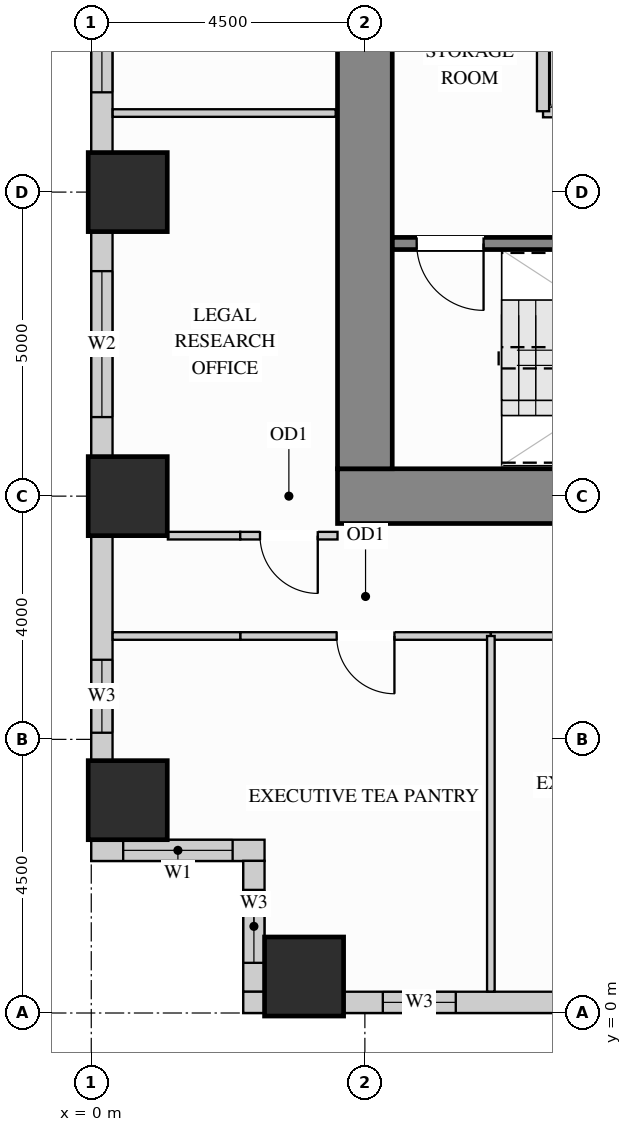
"""IFC4 building model, lengths in metres.
Left out: names, types, materials, properties, quantities, classifications, styles, units other than length and angle.
Written with IfcOpenShell. Run it as: python <this file> out.ifc"""

import sys

from ifc_helpers import new_model, si_unit, direction, frame, frame_2d, origin, origin_2d, place, context, subcontext, project, spatial, rectangle, extrude, source, transform, mapped, element, fill, save


model = new_model("IFC4")
c1 = context("Model", 3, precision=1e-05, world=origin(), true_north=direction((0.0, 1.0)))
c2 = subcontext(c1, "Body", "Model", "MODEL_VIEW")
j1 = project(units=[si_unit("LENGTHUNIT", "METRE"), si_unit("PLANEANGLEUNIT", "RADIAN")], contexts=[c1])
p1 = place(None, origin())
s1 = spatial("IfcSite", under=j1, at=p1, CompositionType="ELEMENT")
p2 = place(p1, origin())
s2 = spatial("IfcBuilding", under=s1, at=p2, CompositionType="ELEMENT")
p3 = place(p2, frame((0.0, 0.0, 51.3)))
s3 = spatial("IfcBuildingStorey", under=s2, at=p3, CompositionType="ELEMENT", Elevation=51.3)
m1 = source(origin(), c2, "Body", "SweptSolid", [
    extrude(rectangle(XDim=1.3, YDim=1.3, at=origin_2d()), origin(), (0.0, 0.0, 1.0), 3.38),
])
for number, where, z_axis, x_axis in (
    (1, (3.5, 0.6, 0.0), (0.0, 0.0, 1.0), (1.0, 0.0, 0.0)),
    (2, (0.6, 13.5, 0.0), (0.0, 0.0, 1.0), (1.0, 0.0, 0.0)),
    (3, (0.6, 3.5, 0.0), (0.0, 0.0, 1.0), (1.0, 0.0, 0.0)),
    (4, (0.6, 8.5, 0.0), (0.0, 0.0, 1.0), (1.0, 0.0, 0.0)),
):
    element("IfcColumn", number, at=place(p3, frame(where, z_axis=z_axis, x_axis=x_axis)), inside=s3, PredefinedType="COLUMN", context=c2, shape_type="MappedRepresentation", body=[
        mapped(m1, transform((0.0, 0.0, 0.0), x_axis=(1.0, 0.0, 0.0), y_axis=(0.0, 1.0, 0.0), z_axis=(0.0, 0.0, 1.0))),
    ])
m2 = source(origin(), c2, "Body", "SweptSolid", [
    extrude(rectangle(XDim=10.9, YDim=0.9, at=frame_2d((5.45, 0.0))), origin(), (0.0, 0.0, 1.0), 3.38),
])
p4 = place(p3, frame((4.05, 8.5, 0.0), z_axis=(0.0, 0.0, 1.0), x_axis=(1.0, 0.0, 0.0)))
e5 = element("IfcWall", 5, at=p4, inside=s3, PredefinedType="SHEAR", context=c2, shape_type="MappedRepresentation", body=[
    mapped(m2, transform((0.0, 0.0, 0.0), x_axis=(1.0, 0.0, 0.0), y_axis=(0.0, 1.0, 0.0), z_axis=(0.0, 0.0, 1.0))),
])
m3 = source(origin(), c2, "Body", "SweptSolid", [
    extrude(rectangle(XDim=20.1, YDim=0.9, at=frame_2d((10.05, 0.0))), origin(), (0.0, 0.0, 1.0), 3.38),
])
p5 = place(p3, frame((4.5, 8.95, 0.0), z_axis=(0.0, 0.0, 1.0), x_axis=(0.0, 1.0, 0.0)))
e6 = element("IfcWall", 6, at=p5, inside=s3, PredefinedType="SHEAR", context=c2, shape_type="MappedRepresentation", body=[
    mapped(m3, transform((0.0, 0.0, 0.0), x_axis=(1.0, 0.0, 0.0), y_axis=(0.0, 1.0, 0.0), z_axis=(0.0, 0.0, 1.0))),
])
p6 = place(p3, frame((0.175, 17.352, 0.0), z_axis=(0.0, 0.0, 1.0), x_axis=(0.0, -1.0, 0.0)))
e7 = element("IfcWall", 7, at=p6, inside=s3, PredefinedType="SOLIDWALL", context=c2, shape_type="SweptSolid", body=[
    extrude(rectangle(XDim=3.204, YDim=0.35, at=frame_2d((1.602, 0.0))), origin(), (0.0, 0.0, 1.0), 2.51),
])
p7 = place(p6, frame((0.411, 0.0, 0.78)))
e8 = element("IfcOpeningElement", 8, at=p7, cuts=e7, PredefinedType="OPENING", context=c2, shape_type="SweptSolid", body=[
    extrude(rectangle(XDim=1.8, YDim=1.55, at=frame_2d((0.9, 0.775))), frame((0.0, 0.185, 0.0), z_axis=(0.0, -1.0, 0.0), x_axis=(1.0, 0.0, 0.0)), (0.0, 0.0, 1.0), 0.37),
])
p8 = place(p3, frame((0.175, 12.852, 0.0), z_axis=(0.0, 0.0, 1.0), x_axis=(0.0, -1.0, 0.0)))
e9 = element("IfcWall", 9, at=p8, inside=s3, PredefinedType="SOLIDWALL", context=c2, shape_type="SweptSolid", body=[
    extrude(rectangle(XDim=3.704, YDim=0.35, at=frame_2d((1.852, 0.0))), origin(), (0.0, 0.0, 1.0), 2.51),
])
p9 = place(p8, frame((0.652, 0.0, 0.78)))
e10 = element("IfcOpeningElement", 10, at=p9, cuts=e9, PredefinedType="OPENING", context=c2, shape_type="SweptSolid", body=[
    extrude(rectangle(XDim=2.4, YDim=1.55, at=frame_2d((1.2, 0.775))), frame((0.0, 0.185, 0.0), z_axis=(0.0, -1.0, 0.0), x_axis=(1.0, 0.0, 0.0)), (0.0, 0.0, 1.0), 0.37),
])
p10 = place(p3, frame((0.175, 7.852, 0.0), z_axis=(0.0, 0.0, 1.0), x_axis=(0.0, -1.0, 0.0)))
e11 = element("IfcWall", 11, at=p10, inside=s3, PredefinedType="SOLIDWALL", context=c2, shape_type="SweptSolid", body=[
    extrude(rectangle(XDim=3.704, YDim=0.35, at=frame_2d((1.852, 0.0))), origin(), (0.0, 0.0, 1.0), 2.51),
])
p11 = place(p10, frame((2.043, 0.0, 0.78)))
e12 = element("IfcOpeningElement", 12, at=p11, cuts=e11, PredefinedType="OPENING", context=c2, shape_type="SweptSolid", body=[
    extrude(rectangle(XDim=1.2, YDim=1.55, at=frame_2d((0.6, 0.775))), frame((0.0, 0.185, 0.0), z_axis=(0.0, -1.0, 0.0), x_axis=(1.0, 0.0, 0.0)), (0.0, 0.0, 1.0), 0.37),
])
p12 = place(p3, frame((0.0, 2.675, 0.0), z_axis=(0.0, 0.0, 1.0), x_axis=(1.0, 0.0, 0.0)))
e13 = element("IfcWall", 13, at=p12, inside=s3, PredefinedType="SOLIDWALL", context=c2, shape_type="SweptSolid", body=[
    extrude(rectangle(XDim=2.85, YDim=0.35, at=frame_2d((1.425, 0.0))), origin(), (0.0, 0.0, 1.0), 3.365),
])
p13 = place(p12, frame((0.525, 0.0, 0.78)))
e14 = element("IfcOpeningElement", 14, at=p13, cuts=e13, PredefinedType="OPENING", context=c2, shape_type="SweptSolid", body=[
    extrude(rectangle(XDim=1.8, YDim=2.1, at=frame_2d((0.9, 1.05))), frame((0.0, 0.185, 0.0), z_axis=(0.0, -1.0, 0.0), x_axis=(1.0, 0.0, 0.0)), (0.0, 0.0, 1.0), 0.37),
])
p14 = place(p3, frame((2.675, 2.502, 0.0), z_axis=(0.0, 0.0, 1.0), x_axis=(0.0, -1.0, 0.0)))
e15 = element("IfcWall", 15, at=p14, inside=s3, PredefinedType="SOLIDWALL", context=c2, shape_type="SweptSolid", body=[
    extrude(rectangle(XDim=2.154, YDim=0.35, at=frame_2d((1.077, 0.0))), origin(), (0.0, 0.0, 1.0), 3.365),
])
p15 = place(p14, frame((0.477, 0.0, 0.78)))
e16 = element("IfcOpeningElement", 16, at=p15, cuts=e15, PredefinedType="OPENING", context=c2, shape_type="SweptSolid", body=[
    extrude(rectangle(XDim=1.2, YDim=2.1, at=frame_2d((0.6, 1.05))), frame((0.0, 0.185, 0.0), z_axis=(0.0, -1.0, 0.0), x_axis=(1.0, 0.0, 0.0)), (0.0, 0.0, 1.0), 0.37),
])
m4 = source(origin(), c2, "Body", "SweptSolid", [
    extrude(rectangle(XDim=0.352, YDim=0.35, at=frame_2d((0.176, 0.0))), origin(), (0.0, 0.0, 1.0), 3.365),
])
p16 = place(p3, frame((2.5, 0.175, 0.0), z_axis=(0.0, 0.0, 1.0), x_axis=(1.0, 0.0, 0.0)))
e17 = element("IfcWall", 17, at=p16, inside=s3, PredefinedType="SOLIDWALL", context=c2, shape_type="MappedRepresentation", body=[
    mapped(m4, transform((0.0, 0.0, 0.0), x_axis=(1.0, 0.0, 0.0), y_axis=(0.0, 1.0, 0.0), z_axis=(0.0, 0.0, 1.0))),
])
p17 = place(p3, frame((4.148, 0.175, 0.0), z_axis=(0.0, 0.0, 1.0), x_axis=(1.0, 0.0, 0.0)))
e18 = element("IfcWall", 18, at=p17, inside=s3, PredefinedType="SOLIDWALL", context=c2, shape_type="SweptSolid", body=[
    extrude(rectangle(XDim=4.204, YDim=0.35, at=frame_2d((2.102, 0.0))), origin(), (0.0, 0.0, 1.0), 2.51),
])
p18 = place(p17, frame((0.647, 0.0, 0.78)))
e19 = element("IfcOpeningElement", 19, at=p18, cuts=e18, PredefinedType="OPENING", context=c2, shape_type="SweptSolid", body=[
    extrude(rectangle(XDim=1.2, YDim=1.55, at=frame_2d((0.6, 0.775))), frame((0.0, 0.185, 0.0), z_axis=(0.0, -1.0, 0.0), x_axis=(1.0, 0.0, 0.0)), (0.0, 0.0, 1.0), 0.37),
])
m5 = source(origin(), c2, "Body", "SweptSolid", [
    extrude(rectangle(XDim=1.19, YDim=0.125, at=frame_2d((0.595, 0.0))), origin(), (0.0, 0.0, 1.0), 3.365),
])
p19 = place(p3, frame((1.26, 7.85, 0.0), z_axis=(0.0, 0.0, 1.0), x_axis=(1.0, 0.0, 0.0)))
e20 = element("IfcWall", 20, at=p19, inside=s3, PredefinedType="PARTITIONING", context=c2, shape_type="MappedRepresentation", body=[
    mapped(m5, transform((0.0, 0.0, 0.0), x_axis=(1.0, 0.0, 0.0), y_axis=(0.0, 1.0, 0.0), z_axis=(0.0, 0.0, 1.0))),
])
p20 = place(p3, frame((2.45, 7.85, 0.0), z_axis=(0.0, 0.0, 1.0), x_axis=(1.0, 0.0, 0.0)))
e21 = element("IfcWall", 21, at=p20, inside=s3, PredefinedType="PARTITIONING", context=c2, shape_type="SweptSolid", body=[
    extrude(rectangle(XDim=1.6, YDim=0.125, at=frame_2d((0.8, 0.0))), origin(), (0.0, 0.0, 1.0), 3.365),
])
p21 = place(p20, frame((0.325, 0.0, 0.0)))
e22 = element("IfcOpeningElement", 22, at=p21, cuts=e21, PredefinedType="OPENING", context=c2, shape_type="SweptSolid", body=[
    extrude(rectangle(XDim=0.95, YDim=2.15, at=frame_2d((0.475, 1.075))), frame((0.0, 0.073, 0.0), z_axis=(0.0, -1.0, 0.0), x_axis=(1.0, 0.0, 0.0)), (0.0, 0.0, 1.0), 0.145),
])
p22 = place(p3, frame((2.45, 6.2, 0.0), z_axis=(0.0, 0.0, 1.0), x_axis=(1.0, 0.0, 0.0)))
e23 = element("IfcWall", 23, at=p22, inside=s3, PredefinedType="PARTITIONING", context=c2, shape_type="SweptSolid", body=[
    extrude(rectangle(XDim=4.122, YDim=0.125, at=frame_2d((2.061, 0.0))), origin(), (0.0, 0.0, 1.0), 2.828),
])
p23 = place(p22, frame((1.586, 0.0, 0.0)))
e24 = element("IfcOpeningElement", 24, at=p23, cuts=e23, PredefinedType="OPENING", context=c2, shape_type="SweptSolid", body=[
    extrude(rectangle(XDim=0.95, YDim=2.15, at=frame_2d((0.475, 1.075))), frame((0.0, 0.073, 0.0), z_axis=(0.0, -1.0, 0.0), x_axis=(1.0, 0.0, 0.0)), (0.0, 0.0, 1.0), 0.145),
])
p24 = place(p3, frame((6.572, 6.2, 0.0), z_axis=(0.0, 0.0, 1.0), x_axis=(1.0, 0.0, 0.0)))
e25 = element("IfcWall", 25, at=p24, inside=s3, PredefinedType="PARTITIONING", context=c2, shape_type="SweptSolid", body=[
    extrude(rectangle(XDim=3.972, YDim=0.125, at=frame_2d((1.986, 0.0))), origin(), (0.0, 0.0, 1.0), 2.828),
])
p25 = place(p24, frame((1.511, 0.0, 0.0)))
e26 = element("IfcOpeningElement", 26, at=p25, cuts=e25, PredefinedType="OPENING", context=c2, shape_type="SweptSolid", body=[
    extrude(rectangle(XDim=0.95, YDim=2.15, at=frame_2d((0.475, 1.075))), frame((0.0, 0.073, 0.0), z_axis=(0.0, -1.0, 0.0), x_axis=(1.0, 0.0, 0.0)), (0.0, 0.0, 1.0), 0.145),
])
m6 = source(origin(), c2, "Body", "SweptSolid", [
    extrude(rectangle(XDim=2.098, YDim=0.125, at=frame_2d((1.049, 0.0))), origin(), (0.0, 0.0, 1.0), 2.828),
])
p26 = place(p3, frame((0.352, 6.2, 0.0), z_axis=(0.0, 0.0, 1.0), x_axis=(1.0, 0.0, 0.0)))
e27 = element("IfcWall", 27, at=p26, inside=s3, PredefinedType="PARTITIONING", context=c2, shape_type="MappedRepresentation", body=[
    mapped(m6, transform((0.0, 0.0, 0.0), x_axis=(1.0, 0.0, 0.0), y_axis=(0.0, 1.0, 0.0), z_axis=(0.0, 0.0, 1.0))),
])
m7 = source(origin(), c2, "Body", "SweptSolid", [
    extrude(rectangle(XDim=5.848, YDim=0.125, at=frame_2d((2.924, 0.0))), origin(), (0.0, 0.0, 1.0), 3.365),
])
p27 = place(p3, frame((6.572, 0.352, 0.0), z_axis=(0.0, 0.0, 1.0), x_axis=(0.0, 1.0, 0.0)))
e28 = element("IfcWall", 28, at=p27, inside=s3, PredefinedType="PARTITIONING", context=c2, shape_type="MappedRepresentation", body=[
    mapped(m7, transform((0.0, 0.0, 0.0), x_axis=(1.0, 0.0, 0.0), y_axis=(0.0, 1.0, 0.0), z_axis=(0.0, 0.0, 1.0))),
])
m8 = source(origin(), c2, "Body", "SweptSolid", [
    extrude(rectangle(XDim=3.668, YDim=0.125, at=frame_2d((1.834, 0.0))), origin(), (0.0, 0.0, 1.0), 3.365),
])
p28 = place(p3, frame((0.352, 14.8, 0.0), z_axis=(0.0, 0.0, 1.0), x_axis=(1.0, 0.0, 0.0)))
e29 = element("IfcWall", 29, at=p28, inside=s3, PredefinedType="PARTITIONING", context=c2, shape_type="MappedRepresentation", body=[
    mapped(m8, transform((0.0, 0.0, 0.0), x_axis=(1.0, 0.0, 0.0), y_axis=(0.0, 1.0, 0.0), z_axis=(0.0, 0.0, 1.0))),
])
m9 = source(origin(), c2, "Body", "SweptSolid", [
    extrude(rectangle(XDim=2.04, YDim=0.2, at=frame_2d((1.02, 0.0))), origin(), (0.0, 0.0, 1.0), 3.365),
])
p29 = place(p3, frame((7.43, 14.83, 0.0), z_axis=(0.0, 0.0, 1.0), x_axis=(1.0, 0.0, 0.0)))
e30 = element("IfcWall", 30, at=p29, inside=s3, PredefinedType="PARTITIONING", context=c2, shape_type="MappedRepresentation", body=[
    mapped(m9, transform((0.0, 0.0, 0.0), x_axis=(1.0, 0.0, 0.0), y_axis=(0.0, 1.0, 0.0), z_axis=(0.0, 0.0, 1.0))),
])
m10 = source(origin(), c2, "Body", "SweptSolid", [
    extrude(rectangle(XDim=2.84, YDim=0.2, at=frame_2d((1.42, 0.0))), origin(), (0.0, 0.0, 1.0), 3.365),
])
p30 = place(p3, frame((7.43, 14.83, 0.0), z_axis=(0.0, 0.0, 1.0), x_axis=(0.0, 1.0, 0.0)))
e31 = element("IfcWall", 31, at=p30, inside=s3, PredefinedType="PARTITIONING", context=c2, shape_type="MappedRepresentation", body=[
    mapped(m10, transform((0.0, 0.0, 0.0), x_axis=(1.0, 0.0, 0.0), y_axis=(0.0, 1.0, 0.0), z_axis=(0.0, 0.0, 1.0))),
])
p31 = place(p3, frame((4.952, 12.655, 0.0), z_axis=(0.0, 0.0, 1.0), x_axis=(1.0, 0.0, 0.0)))
e32 = element("IfcWall", 32, at=p31, inside=s3, PredefinedType="SHEAR", context=c2, shape_type="SweptSolid", body=[
    extrude(rectangle(XDim=7.453, YDim=0.2, at=frame_2d((3.727, 0.0))), origin(), (0.0, 0.0, 1.0), 3.38),
])
p32 = place(p31, frame((0.4, 0.0, 0.0)))
e33 = element("IfcOpeningElement", 33, at=p32, cuts=e32, PredefinedType="OPENING", context=c2, shape_type="SweptSolid", body=[
    extrude(rectangle(XDim=1.1, YDim=2.15, at=frame_2d((0.55, 1.075))), frame((0.0, 0.11, 0.0), z_axis=(0.0, -1.0, 0.0), x_axis=(1.0, 0.0, 0.0)), (0.0, 0.0, 1.0), 0.22),
])
m11 = source(origin(), c2, "Body", "SweptSolid", [
    extrude(rectangle(XDim=0.95, YDim=2.15, at=frame_2d((0.475, 1.075))), frame((0.0, 0.025, 0.0), z_axis=(0.0, -1.0, 0.0), x_axis=(1.0, 0.0, 0.0)), (0.0, 0.0, 1.0), 0.05),
])
p33 = place(p23, origin())
e34 = element("IfcDoor", 34, at=p33, inside=s3, OperationType="SINGLE_SWING_RIGHT", PredefinedType="DOOR", context=c2, shape_type="MappedRepresentation", body=[
    mapped(m11, transform((0.0, 0.0, 0.0), x_axis=(1.0, 0.0, 0.0), y_axis=(0.0, 1.0, 0.0), z_axis=(0.0, 0.0, 1.0))),
])
fill(e24, e34)
p34 = place(p21, origin())
e35 = element("IfcDoor", 35, at=p34, inside=s3, OperationType="SINGLE_SWING_RIGHT", PredefinedType="DOOR", context=c2, shape_type="MappedRepresentation", body=[
    mapped(m11, transform((0.0, 0.0, 0.0), x_axis=(1.0, 0.0, 0.0), y_axis=(0.0, 1.0, 0.0), z_axis=(0.0, 0.0, 1.0))),
])
fill(e22, e35)
m12 = source(origin(), c2, "Body", "SweptSolid", [
    extrude(rectangle(XDim=1.1, YDim=2.15, at=frame_2d((0.55, 1.075))), frame((0.0, 0.025, 0.0), z_axis=(0.0, -1.0, 0.0), x_axis=(1.0, 0.0, 0.0)), (0.0, 0.0, 1.0), 0.05),
])
p35 = place(p32, origin())
e36 = element("IfcDoor", 36, at=p35, inside=s3, OperationType="SINGLE_SWING_RIGHT", PredefinedType="DOOR", context=c2, shape_type="MappedRepresentation", body=[
    mapped(m12, transform((0.0, 0.0, 0.0), x_axis=(1.0, 0.0, 0.0), y_axis=(0.0, 1.0, 0.0), z_axis=(0.0, 0.0, 1.0))),
])
fill(e33, e36)
m13 = source(origin(), c2, "Body", "SweptSolid", [
    extrude(rectangle(XDim=1.8, YDim=1.55, at=frame_2d((0.9, 0.775))), frame((0.0, 0.03, 0.0), z_axis=(0.0, -1.0, 0.0), x_axis=(1.0, 0.0, 0.0)), (0.0, 0.0, 1.0), 0.06),
])
p36 = place(p7, origin())
e37 = element("IfcWindow", 37, at=p36, inside=s3, PartitioningType="SINGLE_PANEL", PredefinedType="WINDOW", context=c2, shape_type="MappedRepresentation", body=[
    mapped(m13, transform((0.0, 0.0, 0.0), x_axis=(1.0, 0.0, 0.0), y_axis=(0.0, 1.0, 0.0), z_axis=(0.0, 0.0, 1.0))),
])
fill(e8, e37)
m14 = source(origin(), c2, "Body", "SweptSolid", [
    extrude(rectangle(XDim=1.8, YDim=2.1, at=frame_2d((0.9, 1.05))), frame((0.0, 0.03, 0.0), z_axis=(0.0, -1.0, 0.0), x_axis=(1.0, 0.0, 0.0)), (0.0, 0.0, 1.0), 0.06),
])
p37 = place(p13, origin())
e38 = element("IfcWindow", 38, at=p37, inside=s3, PartitioningType="SINGLE_PANEL", PredefinedType="WINDOW", context=c2, shape_type="MappedRepresentation", body=[
    mapped(m14, transform((0.0, 0.0, 0.0), x_axis=(1.0, 0.0, 0.0), y_axis=(0.0, 1.0, 0.0), z_axis=(0.0, 0.0, 1.0))),
])
fill(e14, e38)
m15 = source(origin(), c2, "Body", "SweptSolid", [
    extrude(rectangle(XDim=2.4, YDim=1.55, at=frame_2d((1.2, 0.775))), frame((0.0, 0.03, 0.0), z_axis=(0.0, -1.0, 0.0), x_axis=(1.0, 0.0, 0.0)), (0.0, 0.0, 1.0), 0.06),
])
p38 = place(p9, origin())
e39 = element("IfcWindow", 39, at=p38, inside=s3, PartitioningType="SINGLE_PANEL", PredefinedType="WINDOW", context=c2, shape_type="MappedRepresentation", body=[
    mapped(m15, transform((0.0, 0.0, 0.0), x_axis=(1.0, 0.0, 0.0), y_axis=(0.0, 1.0, 0.0), z_axis=(0.0, 0.0, 1.0))),
])
fill(e10, e39)
m16 = source(origin(), c2, "Body", "SweptSolid", [
    extrude(rectangle(XDim=1.2, YDim=1.55, at=frame_2d((0.6, 0.775))), frame((0.0, 0.03, 0.0), z_axis=(0.0, -1.0, 0.0), x_axis=(1.0, 0.0, 0.0)), (0.0, 0.0, 1.0), 0.06),
])
p39 = place(p11, origin())
e40 = element("IfcWindow", 40, at=p39, inside=s3, PartitioningType="SINGLE_PANEL", PredefinedType="WINDOW", context=c2, shape_type="MappedRepresentation", body=[
    mapped(m16, transform((0.0, 0.0, 0.0), x_axis=(1.0, 0.0, 0.0), y_axis=(0.0, 1.0, 0.0), z_axis=(0.0, 0.0, 1.0))),
])
fill(e12, e40)
m17 = source(origin(), c2, "Body", "SweptSolid", [
    extrude(rectangle(XDim=1.2, YDim=2.1, at=frame_2d((0.6, 1.05))), frame((0.0, 0.03, 0.0), z_axis=(0.0, -1.0, 0.0), x_axis=(1.0, 0.0, 0.0)), (0.0, 0.0, 1.0), 0.06),
])
p40 = place(p15, origin())
e41 = element("IfcWindow", 41, at=p40, inside=s3, PartitioningType="SINGLE_PANEL", PredefinedType="WINDOW", context=c2, shape_type="MappedRepresentation", body=[
    mapped(m17, transform((0.0, 0.0, 0.0), x_axis=(1.0, 0.0, 0.0), y_axis=(0.0, 1.0, 0.0), z_axis=(0.0, 0.0, 1.0))),
])
fill(e16, e41)
p41 = place(p18, origin())
e42 = element("IfcWindow", 42, at=p41, inside=s3, PartitioningType="SINGLE_PANEL", PredefinedType="WINDOW", context=c2, shape_type="MappedRepresentation", body=[
    mapped(m16, transform((0.0, 0.0, 0.0), x_axis=(1.0, 0.0, 0.0), y_axis=(0.0, 1.0, 0.0), z_axis=(0.0, 0.0, 1.0))),
])
fill(e19, e42)
save(model, sys.argv[1])
